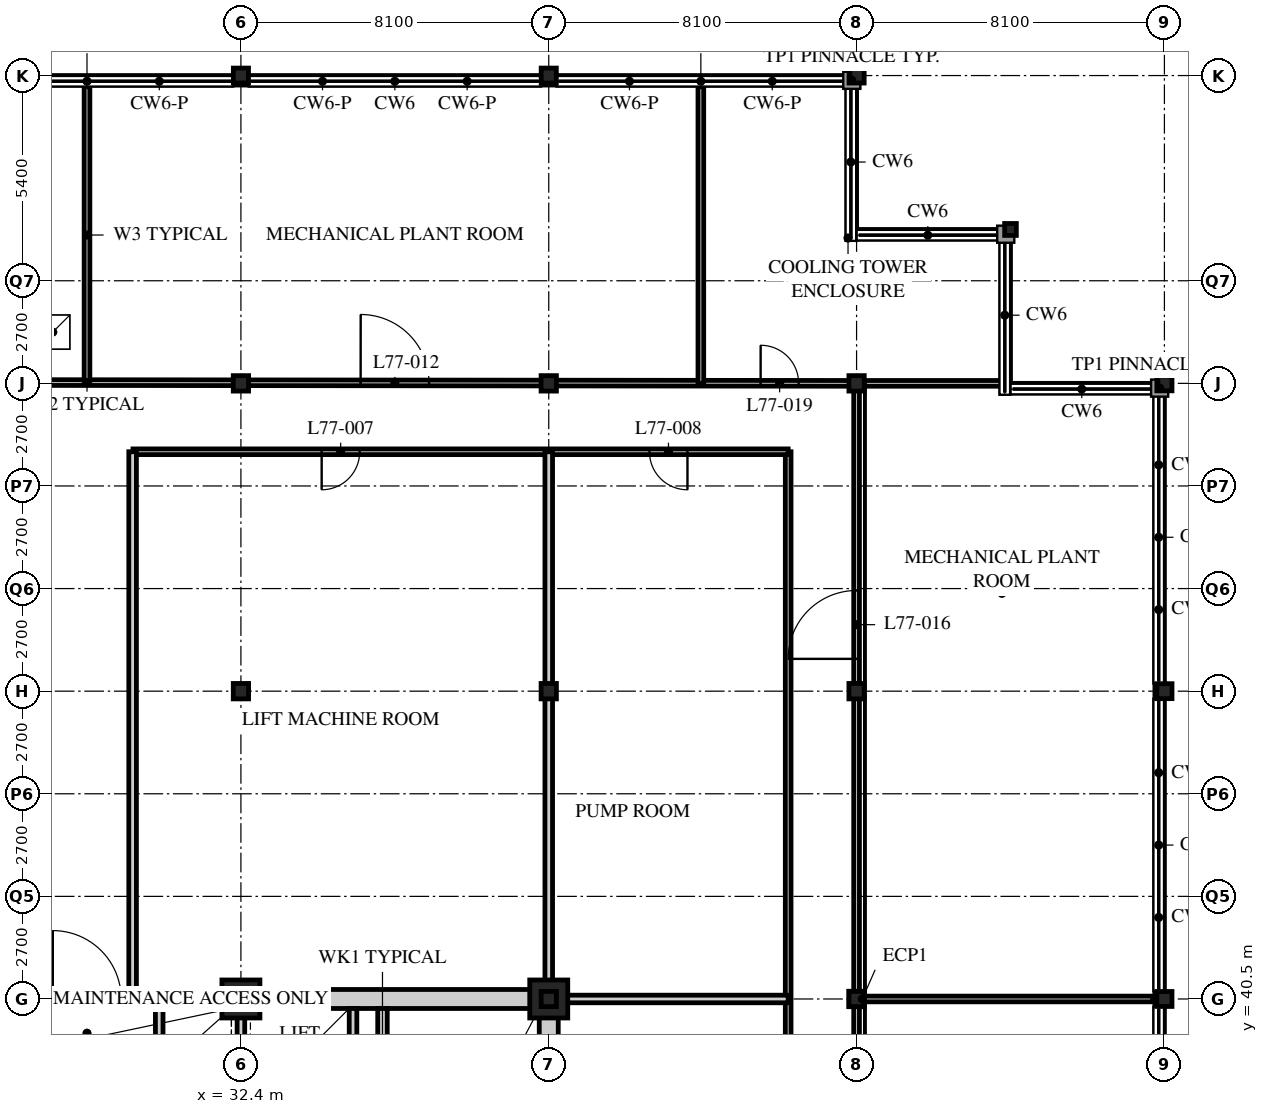
"""IFC4 building model, lengths in metres.
Left out: names, types, materials, properties, quantities, classifications, styles, units other than length and angle.
Written with IfcOpenShell. Run it as: python <this file> out.ifc"""

import sys

from ifc_helpers import new_model, si_unit, direction, frame, frame_2d, origin, origin_2d, place, context, subcontext, project, spatial, rectangle, hollow_rectangle, i_section, extrude, element, fill, save


model = new_model("IFC4")
c1 = context("Model", 3, precision=1e-05, world=origin(), true_north=direction((0.0, 1.0)))
c2 = subcontext(c1, "Body", "Model", "MODEL_VIEW")
j1 = project(units=[si_unit("LENGTHUNIT", "METRE"), si_unit("PLANEANGLEUNIT", "RADIAN")], contexts=[c1])
p1 = place(None, origin())
s1 = spatial("IfcSite", under=j1, at=p1, CompositionType="ELEMENT")
p2 = place(p1, origin())
s2 = spatial("IfcBuilding", under=s1, at=p2, CompositionType="ELEMENT")
p3 = place(p2, frame((0.0, 0.0, 303.9)))
s3 = spatial("IfcBuildingStorey", under=s2, at=p3, CompositionType="ELEMENT", Elevation=303.9)
p4 = place(p3, frame((32.4, 40.5, 0.0), z_axis=(0.0, 0.0, 1.0), x_axis=(1.0, 0.0, 0.0)))
e1 = element("IfcColumn", 1, at=p4, inside=s3, PredefinedType="COLUMN", context=c2, shape_type="SweptSolid", body=[
    extrude(hollow_rectangle(XDim=1.0, YDim=1.0, WallThickness=0.1, at=origin_2d()), origin(), (0.0, 0.0, 1.0), 6.0),
])
for number, where, z_axis, x_axis in (
    (2, (32.4, 48.6, 0.0), (0.0, 0.0, 1.0), (1.0, 0.0, 0.0)),
    (3, (32.4, 56.7, 0.0), (0.0, 0.0, 1.0), (1.0, 0.0, 0.0)),
):
    element("IfcColumn", number, at=place(p3, frame(where, z_axis=z_axis, x_axis=x_axis)), inside=s3, PredefinedType="COLUMN", context=c2, shape_type="SweptSolid", body=[
        extrude(i_section(OverallWidth=0.403, OverallDepth=0.406, WebThickness=0.027, FlangeThickness=0.043, FilletRadius=0.015, at=origin_2d()), origin(), (0.0, 0.0, 1.0), 6.0),
    ])
p5 = place(p3, frame((32.4, 64.8, 0.0), z_axis=(0.0, 0.0, 1.0), x_axis=(1.0, 0.0, 0.0)))
e4 = element("IfcColumn", 4, at=p5, inside=s3, PredefinedType="COLUMN", context=c2, shape_type="SweptSolid", body=[
    extrude(i_section(OverallWidth=0.399, OverallDepth=0.394, WebThickness=0.023, FlangeThickness=0.037, FilletRadius=0.015, at=origin_2d()), origin(), (0.0, 0.0, 1.0), 6.0),
])
p6 = place(p3, frame((40.5, 40.5, 0.0), z_axis=(0.0, 0.0, 1.0), x_axis=(1.0, 0.0, 0.0)))
e5 = element("IfcColumn", 5, at=p6, inside=s3, PredefinedType="COLUMN", context=c2, shape_type="SweptSolid", body=[
    extrude(hollow_rectangle(XDim=1.0, YDim=1.0, WallThickness=0.1, at=origin_2d()), origin(), (0.0, 0.0, 1.0), 6.0),
])
for number, where, z_axis, x_axis in (
    (6, (40.5, 48.6, 0.0), (0.0, 0.0, 1.0), (1.0, 0.0, 0.0)),
    (7, (40.5, 56.7, 0.0), (0.0, 0.0, 1.0), (1.0, 0.0, 0.0)),
):
    element("IfcColumn", number, at=place(p3, frame(where, z_axis=z_axis, x_axis=x_axis)), inside=s3, PredefinedType="COLUMN", context=c2, shape_type="SweptSolid", body=[
        extrude(i_section(OverallWidth=0.403, OverallDepth=0.406, WebThickness=0.027, FlangeThickness=0.043, FilletRadius=0.015, at=origin_2d()), origin(), (0.0, 0.0, 1.0), 6.0),
    ])
p7 = place(p3, frame((40.5, 64.8, 0.0), z_axis=(0.0, 0.0, 1.0), x_axis=(1.0, 0.0, 0.0)))
e8 = element("IfcColumn", 8, at=p7, inside=s3, PredefinedType="COLUMN", context=c2, shape_type="SweptSolid", body=[
    extrude(i_section(OverallWidth=0.399, OverallDepth=0.394, WebThickness=0.023, FlangeThickness=0.037, FilletRadius=0.015, at=origin_2d()), origin(), (0.0, 0.0, 1.0), 6.0),
])
for number, where, z_axis, x_axis in (
    (9, (48.6, 40.5, 0.0), (0.0, 0.0, 1.0), (1.0, 0.0, 0.0)),
    (10, (48.6, 48.6, 0.0), (0.0, 0.0, 1.0), (1.0, 0.0, 0.0)),
    (11, (48.6, 56.7, 0.0), (0.0, 0.0, 1.0), (1.0, 0.0, 0.0)),
):
    element("IfcColumn", number, at=place(p3, frame(where, z_axis=z_axis, x_axis=x_axis)), inside=s3, PredefinedType="COLUMN", context=c2, shape_type="SweptSolid", body=[
        extrude(i_section(OverallWidth=0.403, OverallDepth=0.406, WebThickness=0.027, FlangeThickness=0.043, FilletRadius=0.015, at=origin_2d()), origin(), (0.0, 0.0, 1.0), 6.0),
    ])
p8 = place(p3, frame((48.6, 64.8, 0.0), z_axis=(0.0, 0.0, 1.0), x_axis=(1.0, 0.0, 0.0)))
e12 = element("IfcColumn", 12, at=p8, inside=s3, PredefinedType="COLUMN", context=c2, shape_type="SweptSolid", body=[
    extrude(i_section(OverallWidth=0.399, OverallDepth=0.394, WebThickness=0.023, FlangeThickness=0.037, FilletRadius=0.015, at=origin_2d()), origin(), (0.0, 0.0, 1.0), 6.0),
])
p9 = place(p3, frame((52.65, 60.75, 0.0), z_axis=(0.0, 0.0, 1.0), x_axis=(1.0, 0.0, 0.0)))
e13 = element("IfcColumn", 13, at=p9, inside=s3, PredefinedType="COLUMN", context=c2, shape_type="SweptSolid", body=[
    extrude(i_section(OverallWidth=0.307, OverallDepth=0.314, WebThickness=0.012, FlangeThickness=0.019, FilletRadius=0.015, at=origin_2d()), origin(), (0.0, 0.0, 1.0), 6.0),
])
for number, where, z_axis, x_axis in (
    (14, (56.7, 40.5, 0.0), (0.0, 0.0, 1.0), (1.0, 0.0, 0.0)),
    (15, (56.7, 48.6, 0.0), (0.0, 0.0, 1.0), (1.0, 0.0, 0.0)),
    (16, (56.7, 56.7, 0.0), (0.0, 0.0, 1.0), (1.0, 0.0, 0.0)),
):
    element("IfcColumn", number, at=place(p3, frame(where, z_axis=z_axis, x_axis=x_axis)), inside=s3, PredefinedType="COLUMN", context=c2, shape_type="SweptSolid", body=[
        extrude(i_section(OverallWidth=0.399, OverallDepth=0.394, WebThickness=0.023, FlangeThickness=0.037, FilletRadius=0.015, at=origin_2d()), origin(), (0.0, 0.0, 1.0), 6.0),
    ])
p10 = place(p3, frame((56.575, 24.55, 6.0), z_axis=(0.0, 0.0, 1.0), x_axis=(0.0, 1.0, 0.0)))
e17 = element("IfcWall", 17, at=p10, inside=s3, PredefinedType="PARAPET", context=c2, shape_type="SweptSolid", body=[
    extrude(rectangle(XDim=32.15, YDim=0.25, at=frame_2d((16.075, 0.0))), origin(), (0.0, 0.0, 1.0), 1.285),
])
p11 = place(p3, frame((56.45, 56.575, 6.0), z_axis=(0.0, 0.0, 1.0), x_axis=(-1.0, 0.0, 0.0)))
e18 = element("IfcWall", 18, at=p11, inside=s3, PredefinedType="PARAPET", context=c2, shape_type="SweptSolid", body=[
    extrude(rectangle(XDim=3.8, YDim=0.25, at=frame_2d((1.9, 0.0))), origin(), (0.0, 0.0, 1.0), 1.285),
])
p12 = place(p3, frame((52.525, 56.45, 6.0), z_axis=(0.0, 0.0, 1.0), x_axis=(0.0, 1.0, 0.0)))
e19 = element("IfcWall", 19, at=p12, inside=s3, PredefinedType="PARAPET", context=c2, shape_type="SweptSolid", body=[
    extrude(rectangle(XDim=4.3, YDim=0.25, at=frame_2d((2.15, 0.0))), origin(), (0.0, 0.0, 1.0), 1.285),
])
p13 = place(p3, frame((52.4, 60.625, 6.0), z_axis=(0.0, 0.0, 1.0), x_axis=(-1.0, 0.0, 0.0)))
e20 = element("IfcWall", 20, at=p13, inside=s3, PredefinedType="PARAPET", context=c2, shape_type="SweptSolid", body=[
    extrude(rectangle(XDim=3.8, YDim=0.25, at=frame_2d((1.9, 0.0))), origin(), (0.0, 0.0, 1.0), 1.285),
])
p14 = place(p3, frame((48.475, 60.5, 6.0), z_axis=(0.0, 0.0, 1.0), x_axis=(0.0, 1.0, 0.0)))
e21 = element("IfcWall", 21, at=p14, inside=s3, PredefinedType="PARAPET", context=c2, shape_type="SweptSolid", body=[
    extrude(rectangle(XDim=4.3, YDim=0.25, at=frame_2d((2.15, 0.0))), origin(), (0.0, 0.0, 1.0), 1.285),
])
p15 = place(p3, frame((48.35, 64.675, 6.0), z_axis=(0.0, 0.0, 1.0), x_axis=(-1.0, 0.0, 0.0)))
e22 = element("IfcWall", 22, at=p15, inside=s3, PredefinedType="PARAPET", context=c2, shape_type="SweptSolid", body=[
    extrude(rectangle(XDim=40.25, YDim=0.25, at=frame_2d((20.125, 0.0))), origin(), (0.0, 0.0, 1.0), 1.285),
])
for number, where, z_axis, x_axis in (
    (23, (32.4, 40.5, 6.0), (0.0, 0.0, 1.0), (1.0, 0.0, 0.0)),
    (24, (40.5, 40.5, 6.0), (0.0, 0.0, 1.0), (1.0, 0.0, 0.0)),
    (25, (48.6, 40.5, 6.0), (0.0, 0.0, 1.0), (1.0, 0.0, 0.0)),
):
    element("IfcColumn", number, at=place(p3, frame(where, z_axis=z_axis, x_axis=x_axis)), inside=s3, PredefinedType="COLUMN", context=c2, shape_type="SweptSolid", body=[
        extrude(hollow_rectangle(XDim=0.4, YDim=0.4, WallThickness=0.016, at=origin_2d()), origin(), (0.0, 0.0, 1.0), 13.896),
    ])
p16 = place(p3, frame((8.1, 56.74, 0.0), z_axis=(0.0, 0.0, 1.0), x_axis=(0.999999511317, -0.000988618344, 0.0)))
e26 = element("IfcWall", 26, at=p16, inside=s3, PredefinedType="PARTITIONING", context=c2, shape_type="SweptSolid", body=[
    extrude(rectangle(XDim=40.5, YDim=0.15, at=frame_2d((20.25, 0.0))), origin(), (0.0, 0.0, 1.0), 5.038),
])
p17 = place(p16, frame((11.25, 0.0, 0.0)))
e27 = element("IfcOpeningElement", 27, at=p17, cuts=e26, PredefinedType="OPENING", context=c2, shape_type="SweptSolid", body=[
    extrude(rectangle(XDim=1.8, YDim=2.4, at=frame_2d((0.9, 1.2))), frame((0.0, 0.085, 0.0), z_axis=(0.0, -1.0, 0.0), x_axis=(1.0, 0.0, 0.0)), (0.0, 0.0, 1.0), 0.17),
])
p18 = place(p16, frame((27.45, 0.0, 0.0)))
e28 = element("IfcOpeningElement", 28, at=p18, cuts=e26, PredefinedType="OPENING", context=c2, shape_type="SweptSolid", body=[
    extrude(rectangle(XDim=1.8, YDim=2.4, at=frame_2d((0.9, 1.2))), frame((0.0, 0.085, 0.0), z_axis=(0.0, -1.0, 0.0), x_axis=(1.0, 0.0, 0.0)), (0.0, 0.0, 1.0), 0.17),
])
p19 = place(p16, frame((37.975, 0.0, 0.0)))
e29 = element("IfcOpeningElement", 29, at=p19, cuts=e26, PredefinedType="OPENING", context=c2, shape_type="SweptSolid", body=[
    extrude(rectangle(XDim=1.0, YDim=2.1, at=frame_2d((0.5, 1.05))), frame((0.0, 0.085, 0.0), z_axis=(0.0, -1.0, 0.0), x_axis=(1.0, 0.0, 0.0)), (0.0, 0.0, 1.0), 0.17),
])
p20 = place(p16, frame((1.525, 0.0, 0.0)))
e30 = element("IfcOpeningElement", 30, at=p20, cuts=e26, PredefinedType="OPENING", context=c2, shape_type="SweptSolid", body=[
    extrude(rectangle(XDim=1.0, YDim=2.1, at=frame_2d((0.5, 1.05))), frame((0.0, 0.085, 0.0), z_axis=(0.0, -1.0, 0.0), x_axis=(1.0, 0.0, 0.0)), (0.0, 0.0, 1.0), 0.17),
])
p21 = place(p3, frame((48.6, 22.5, 0.0), z_axis=(0.0, 0.0, 1.0), x_axis=(0.0, 1.0, 0.0)))
e31 = element("IfcWall", 31, at=p21, inside=s3, PredefinedType="PARTITIONING", context=c2, shape_type="SweptSolid", body=[
    extrude(rectangle(XDim=34.2, YDim=0.15, at=frame_2d((17.1, 0.0))), origin(), (0.0, 0.0, 1.0), 5.038),
])
p22 = place(p21, frame((7.1, 0.0, 0.0)))
e32 = element("IfcOpeningElement", 32, at=p22, cuts=e31, PredefinedType="OPENING", context=c2, shape_type="SweptSolid", body=[
    extrude(rectangle(XDim=1.8, YDim=2.4, at=frame_2d((0.9, 1.2))), frame((0.0, 0.085, 0.0), z_axis=(0.0, -1.0, 0.0), x_axis=(1.0, 0.0, 0.0)), (0.0, 0.0, 1.0), 0.17),
])
p23 = place(p21, frame((26.95, 0.0, 0.0)))
e33 = element("IfcOpeningElement", 33, at=p23, cuts=e31, PredefinedType="OPENING", context=c2, shape_type="SweptSolid", body=[
    extrude(rectangle(XDim=1.8, YDim=2.4, at=frame_2d((0.9, 1.2))), frame((0.0, 0.085, 0.0), z_axis=(0.0, -1.0, 0.0), x_axis=(1.0, 0.0, 0.0)), (0.0, 0.0, 1.0), 0.17),
])
p24 = place(p3, frame((46.8, 24.3, 0.0), z_axis=(0.0, 0.0, 1.0), x_axis=(0.0, 1.0, 0.0)))
e34 = element("IfcWall", 34, at=p24, inside=s3, PredefinedType="PARTITIONING", context=c2, shape_type="SweptSolid", body=[
    extrude(rectangle(XDim=30.6, YDim=0.15, at=frame_2d((15.3, 0.0))), origin(), (0.0, 0.0, 1.0), 5.8),
])
p25 = place(p24, frame((3.55, 0.0, 0.0)))
e35 = element("IfcOpeningElement", 35, at=p25, cuts=e34, PredefinedType="OPENING", context=c2, shape_type="SweptSolid", body=[
    extrude(rectangle(XDim=1.0, YDim=2.1, at=frame_2d((0.5, 1.05))), frame((0.0, 0.085, 0.0), z_axis=(0.0, -1.0, 0.0), x_axis=(1.0, 0.0, 0.0)), (0.0, 0.0, 1.0), 0.17),
])
p26 = place(p24, frame((11.65, 0.0, 0.0)))
e36 = element("IfcOpeningElement", 36, at=p26, cuts=e34, PredefinedType="OPENING", context=c2, shape_type="SweptSolid", body=[
    extrude(rectangle(XDim=1.0, YDim=2.1, at=frame_2d((0.5, 1.05))), frame((0.0, 0.085, 0.0), z_axis=(0.0, -1.0, 0.0), x_axis=(1.0, 0.0, 0.0)), (0.0, 0.0, 1.0), 0.17),
])
p27 = place(p3, frame((46.8, 54.9, 0.0), z_axis=(0.0, 0.0, 1.0), x_axis=(-1.0, 0.0, 0.0)))
e37 = element("IfcWall", 37, at=p27, inside=s3, PredefinedType="PARTITIONING", context=c2, shape_type="SweptSolid", body=[
    extrude(rectangle(XDim=17.24, YDim=0.15, at=frame_2d((8.62, 0.0))), origin(), (0.0, 0.0, 1.0), 5.8),
])
p28 = place(p27, frame((11.275, 0.0, 0.0)))
e38 = element("IfcOpeningElement", 38, at=p28, cuts=e37, PredefinedType="OPENING", context=c2, shape_type="SweptSolid", body=[
    extrude(rectangle(XDim=1.0, YDim=2.1, at=frame_2d((0.5, 1.05))), frame((0.0, 0.085, 0.0), z_axis=(0.0, -1.0, 0.0), x_axis=(1.0, 0.0, 0.0)), (0.0, 0.0, 1.0), 0.17),
])
p29 = place(p27, frame((2.65, 0.0, 0.0)))
e39 = element("IfcOpeningElement", 39, at=p29, cuts=e37, PredefinedType="OPENING", context=c2, shape_type="SweptSolid", body=[
    extrude(rectangle(XDim=1.0, YDim=2.1, at=frame_2d((0.5, 1.05))), frame((0.0, 0.085, 0.0), z_axis=(0.0, -1.0, 0.0), x_axis=(1.0, 0.0, 0.0)), (0.0, 0.0, 1.0), 0.17),
])
p30 = place(p3, frame((40.5, 40.5, 0.0), z_axis=(0.0, 0.0, 1.0), x_axis=(0.0, 1.0, 0.0)))
e40 = element("IfcWall", 40, at=p30, inside=s3, PredefinedType="SOLIDWALL", context=c2, shape_type="SweptSolid", body=[
    extrude(rectangle(XDim=14.4, YDim=0.2, at=frame_2d((7.2, 0.0))), origin(), (0.0, 0.0, 1.0), 5.038),
])
p31 = place(p3, frame((29.55, 40.5, 0.0), z_axis=(0.0, 0.0, 1.0), x_axis=(0.0, 1.0, 0.0)))
e41 = element("IfcWall", 41, at=p31, inside=s3, PredefinedType="SOLIDWALL", context=c2, shape_type="SweptSolid", body=[
    extrude(rectangle(XDim=14.4, YDim=0.2, at=frame_2d((7.2, 0.0))), origin(), (0.0, 0.0, 1.0), 5.8),
])
p32 = place(p3, frame((40.5, 40.5, 0.0), z_axis=(0.0, 0.0, 1.0), x_axis=(1.0, 0.0, 0.0)))
e42 = element("IfcWall", 42, at=p32, inside=s3, PredefinedType="SOLIDWALL", context=c2, shape_type="SweptSolid", body=[
    extrude(rectangle(XDim=6.3, YDim=0.2, at=frame_2d((3.15, 0.0))), origin(), (0.0, 0.0, 1.0), 5.038),
])
p33 = place(p3, frame((28.35, 56.7, 0.0), z_axis=(0.0, 0.0, 1.0), x_axis=(0.0, 1.0, 0.0)))
e43 = element("IfcWall", 43, at=p33, inside=s3, PredefinedType="PARTITIONING", context=c2, shape_type="SweptSolid", body=[
    extrude(rectangle(XDim=7.807, YDim=0.15, at=frame_2d((3.904, 0.0))), origin(), (0.0, 0.0, 1.0), 5.8),
])
p34 = place(p3, frame((48.6, 40.5, 0.0), z_axis=(0.0, 0.0, 1.0), x_axis=(1.0, 0.0, 0.0)))
e44 = element("IfcWall", 44, at=p34, inside=s3, PredefinedType="PARTITIONING", context=c2, shape_type="SweptSolid", body=[
    extrude(rectangle(XDim=7.8, YDim=0.15, at=frame_2d((3.9, 0.0))), origin(), (0.0, 0.0, 1.0), 5.038),
])
p35 = place(p3, frame((48.6, 56.7, 0.0), z_axis=(0.0, 0.0, 1.0), x_axis=(1.0, 0.0, 0.0)))
e45 = element("IfcWall", 45, at=p35, inside=s3, PredefinedType="PARTITIONING", context=c2, shape_type="SweptSolid", body=[
    extrude(rectangle(XDim=3.877, YDim=0.15, at=frame_2d((1.938, 0.0))), origin(), (0.0, 0.0, 1.0), 5.038),
])
p36 = place(p3, frame((44.502, 56.7, 0.0), z_axis=(0.0, 0.0, 1.0), x_axis=(0.0, 1.0, 0.0)))
e46 = element("IfcWall", 46, at=p36, inside=s3, PredefinedType="PARTITIONING", context=c2, shape_type="SweptSolid", body=[
    extrude(rectangle(XDim=7.807, YDim=0.15, at=frame_2d((3.904, 0.0))), origin(), (0.0, 0.0, 1.0), 5.8),
])
p37 = place(p3, frame((15.95, 40.5, 0.0), z_axis=(0.0, 0.0, 1.0), x_axis=(1.0, 0.0, 0.0)))
e47 = element("IfcWall", 47, at=p37, inside=s3, PredefinedType="SOLIDWALL", context=c2, shape_type="SweptSolid", body=[
    extrude(rectangle(XDim=24.8, YDim=0.5, at=frame_2d((12.4, 0.0))), origin(), (0.0, 0.0, 1.0), 5.038),
])
p38 = place(p37, frame((11.5, 0.0, 0.0)))
e48 = element("IfcOpeningElement", 48, at=p38, cuts=e47, PredefinedType="OPENING", context=c2, shape_type="SweptSolid", body=[
    extrude(rectangle(XDim=1.8, YDim=2.4, at=frame_2d((0.9, 1.2))), frame((0.0, 0.26, 0.0), z_axis=(0.0, -1.0, 0.0), x_axis=(1.0, 0.0, 0.0)), (0.0, 0.0, 1.0), 0.52),
])
p39 = place(p3, frame((40.5, 24.55, 0.0), z_axis=(0.0, 0.0, 1.0), x_axis=(0.0, 1.0, 0.0)))
e49 = element("IfcWall", 49, at=p39, inside=s3, PredefinedType="SOLIDWALL", context=c2, shape_type="SweptSolid", body=[
    extrude(rectangle(XDim=15.7, YDim=0.5, at=frame_2d((7.85, 0.0))), origin(), (0.0, 0.0, 1.0), 5.038),
])
p40 = place(p3, frame((32.4, 32.5, 0.0), z_axis=(0.0, 0.0, 1.0), x_axis=(0.0, 1.0, 0.0)))
e50 = element("IfcWall", 50, at=p40, inside=s3, PredefinedType="SOLIDWALL", context=c2, shape_type="SweptSolid", body=[
    extrude(rectangle(XDim=7.75, YDim=0.2, at=frame_2d((3.875, 0.0))), origin(), (0.0, 0.0, 1.0), 5.038),
])
p41 = place(p40, frame((1.9, 0.0, 0.0)))
e51 = element("IfcOpeningElement", 51, at=p41, cuts=e50, PredefinedType="OPENING", context=c2, shape_type="SweptSolid", body=[
    extrude(rectangle(XDim=1.2, YDim=2.1, at=frame_2d((0.6, 1.05))), frame((0.0, 0.11, 0.0), z_axis=(0.0, -1.0, 0.0), x_axis=(1.0, 0.0, 0.0)), (0.0, 0.0, 1.0), 0.22),
])
p42 = place(p3, frame((36.125, 32.5, 0.0), z_axis=(0.0, 0.0, 1.0), x_axis=(0.0, 1.0, 0.0)))
e52 = element("IfcWall", 52, at=p42, inside=s3, PredefinedType="SOLIDWALL", context=c2, shape_type="SweptSolid", body=[
    extrude(rectangle(XDim=7.75, YDim=0.25, at=frame_2d((3.875, 0.0))), origin(), (0.0, 0.0, 1.0), 5.8),
])
p43 = place(p42, frame((0.45, 0.0, 0.0)))
e53 = element("IfcOpeningElement", 53, at=p43, cuts=e52, PredefinedType="OPENING", context=c2, shape_type="SweptSolid", body=[
    extrude(rectangle(XDim=1.2, YDim=2.1, at=frame_2d((0.6, 1.05))), frame((0.0, 0.135, 0.0), z_axis=(0.0, -1.0, 0.0), x_axis=(1.0, 0.0, 0.0)), (0.0, 0.0, 1.0), 0.27),
])
p44 = place(p3, frame((35.35, 37.65, 0.0), z_axis=(0.0, 0.0, 1.0), x_axis=(0.0, 1.0, 0.0)))
e54 = element("IfcWall", 54, at=p44, inside=s3, PredefinedType="SOLIDWALL", context=c2, shape_type="SweptSolid", body=[
    extrude(rectangle(XDim=2.6, YDim=0.2, at=frame_2d((1.3, 0.0))), origin(), (0.0, 0.0, 1.0), 5.8),
])
p45 = place(p3, frame((30.25, 38.65, 0.0), z_axis=(0.0, 0.0, 1.0), x_axis=(0.0, 1.0, 0.0)))
e55 = element("IfcWall", 55, at=p45, inside=s3, PredefinedType="SOLIDWALL", context=c2, shape_type="SweptSolid", body=[
    extrude(rectangle(XDim=1.6, YDim=0.2, at=frame_2d((0.8, 0.0))), origin(), (0.0, 0.0, 1.0), 5.8),
])
p46 = place(p28, origin())
e56 = element("IfcDoor", 56, at=p46, inside=s3, OperationType="SINGLE_SWING_RIGHT", PredefinedType="DOOR", context=c2, shape_type="SweptSolid", body=[
    extrude(rectangle(XDim=1.0, YDim=2.1, at=frame_2d((0.5, 1.05))), frame((0.0, 0.025, 0.0), z_axis=(0.0, -1.0, 0.0), x_axis=(1.0, 0.0, 0.0)), (0.0, 0.0, 1.0), 0.05),
])
fill(e38, e56)
p47 = place(p29, origin())
e57 = element("IfcDoor", 57, at=p47, inside=s3, OperationType="SINGLE_SWING_LEFT", PredefinedType="DOOR", context=c2, shape_type="SweptSolid", body=[
    extrude(rectangle(XDim=1.0, YDim=2.1, at=frame_2d((0.5, 1.05))), frame((0.0, 0.025, 0.0), z_axis=(0.0, -1.0, 0.0), x_axis=(1.0, 0.0, 0.0)), (0.0, 0.0, 1.0), 0.05),
])
fill(e39, e57)
p48 = place(p18, origin())
e58 = element("IfcDoor", 58, at=p48, inside=s3, OperationType="DOUBLE_DOOR_SINGLE_SWING", PredefinedType="DOOR", context=c2, shape_type="SweptSolid", body=[
    extrude(rectangle(XDim=1.8, YDim=2.4, at=frame_2d((0.9, 1.2))), frame((0.0, 0.025, 0.0), z_axis=(0.0, -1.0, 0.0), x_axis=(1.0, 0.0, 0.0)), (0.0, 0.0, 1.0), 0.05),
])
fill(e28, e58)
p49 = place(p23, origin())
e59 = element("IfcDoor", 59, at=p49, inside=s3, OperationType="DOUBLE_DOOR_SINGLE_SWING", PredefinedType="DOOR", context=c2, shape_type="SweptSolid", body=[
    extrude(rectangle(XDim=1.8, YDim=2.4, at=frame_2d((0.9, 1.2))), frame((0.0, 0.025, 0.0), z_axis=(0.0, -1.0, 0.0), x_axis=(1.0, 0.0, 0.0)), (0.0, 0.0, 1.0), 0.05),
])
fill(e33, e59)
p50 = place(p19, origin())
e60 = element("IfcDoor", 60, at=p50, inside=s3, OperationType="SINGLE_SWING_LEFT", PredefinedType="DOOR", context=c2, shape_type="SweptSolid", body=[
    extrude(rectangle(XDim=1.0, YDim=2.1, at=frame_2d((0.5, 1.05))), frame((0.0, 0.025, 0.0), z_axis=(0.0, -1.0, 0.0), x_axis=(1.0, 0.0, 0.0)), (0.0, 0.0, 1.0), 0.05),
])
fill(e29, e60)
p51 = place(p38, origin())
e61 = element("IfcDoor", 61, at=p51, inside=s3, OperationType="DOUBLE_DOOR_SINGLE_SWING", PredefinedType="DOOR", context=c2, shape_type="SweptSolid", body=[
    extrude(rectangle(XDim=1.8, YDim=2.4, at=frame_2d((0.9, 1.2))), frame((0.0, 0.025, 0.0), z_axis=(0.0, -1.0, 0.0), x_axis=(1.0, 0.0, 0.0)), (0.0, 0.0, 1.0), 0.05),
])
fill(e48, e61)
save(model, sys.argv[1])
